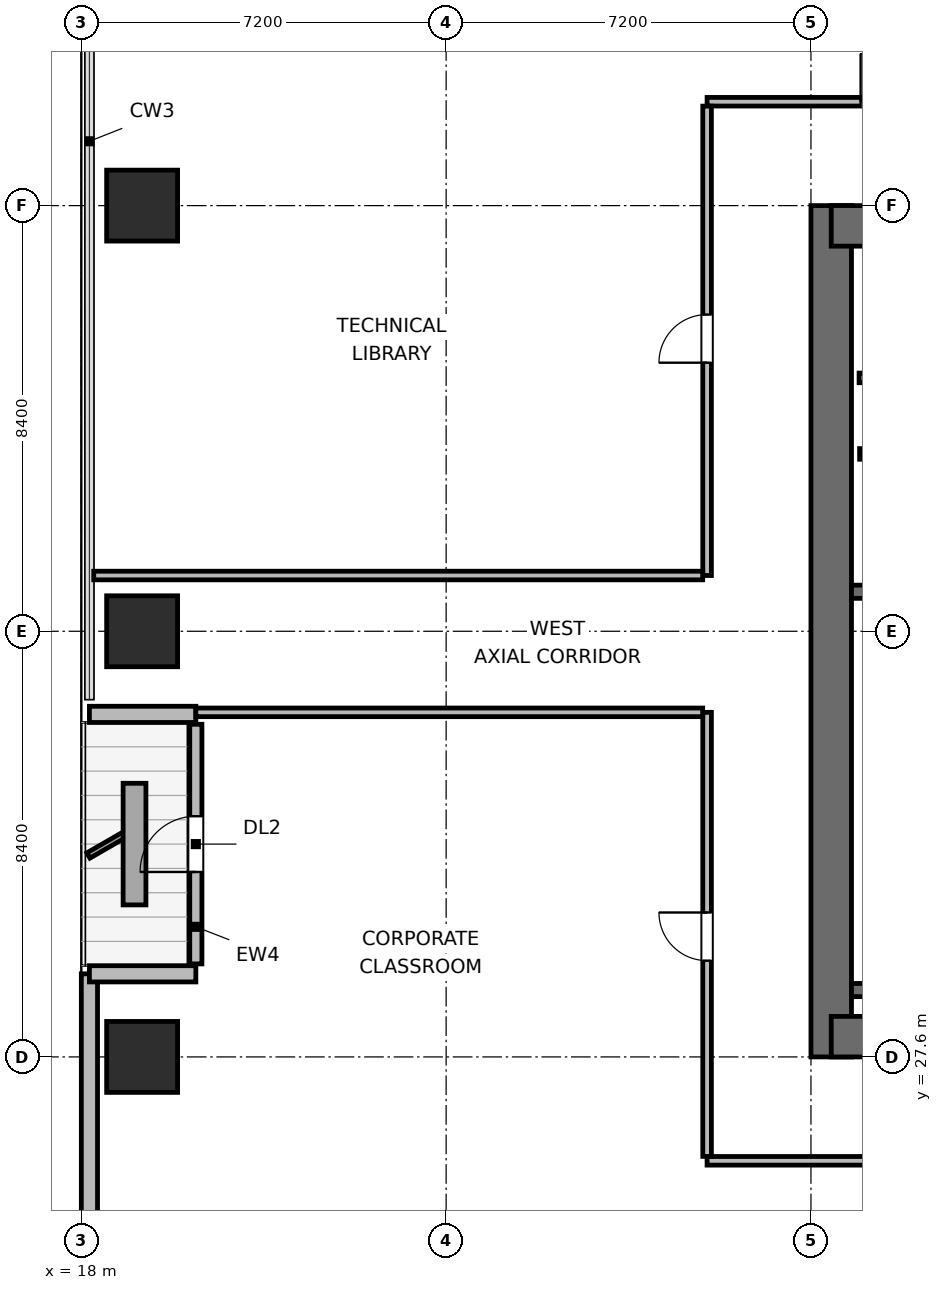
"""IFC4 building model, lengths in metres.
Left out: names, types, materials, properties, quantities, classifications, styles, units other than length and angle.
Written with IfcOpenShell. Run it as: python <this file> out.ifc"""

import sys

from ifc_helpers import new_model, si_unit, direction, frame, frame_2d, origin, origin_2d, place, context, subcontext, project, spatial, rectangle, extrude, element, fill, save


model = new_model("IFC4")
c1 = context("Model", 3, precision=1e-05, world=origin(), true_north=direction((0.0, 1.0)))
c2 = subcontext(c1, "Body", "Model", "MODEL_VIEW")
j1 = project(units=[si_unit("LENGTHUNIT", "METRE"), si_unit("PLANEANGLEUNIT", "RADIAN")], contexts=[c1])
p1 = place(None, origin())
s1 = spatial("IfcSite", under=j1, at=p1, CompositionType="ELEMENT")
p2 = place(p1, origin())
s2 = spatial("IfcBuilding", under=s1, at=p2, CompositionType="ELEMENT")
p3 = place(p2, frame((0.0, 0.0, 141.6)))
s3 = spatial("IfcBuildingStorey", under=s2, at=p3, CompositionType="ELEMENT", Elevation=141.6)
p4 = place(p3, frame((32.8, 27.6, 0.0), z_axis=(0.0, 0.0, 1.0), x_axis=(0.0, 1.0, 0.0)))
e1 = element("IfcWall", 1, at=p4, inside=s3, PredefinedType="SHEAR", context=c2, shape_type="SweptSolid", body=[
    extrude(rectangle(XDim=16.8, YDim=0.8, at=frame_2d((8.4, 0.0))), origin(), (0.0, 0.0, 1.0), 3.9),
])
p5 = place(p3, frame((32.8, 28.0, 0.0), z_axis=(0.0, 0.0, 1.0), x_axis=(1.0, 0.0, 0.0)))
e2 = element("IfcWall", 2, at=p5, inside=s3, PredefinedType="SHEAR", context=c2, shape_type="SweptSolid", body=[
    extrude(rectangle(XDim=9.2, YDim=0.8, at=frame_2d((4.6, 0.0))), origin(), (0.0, 0.0, 1.0), 3.9),
])
p6 = place(p5, frame((4.975, 0.0, 0.0)))
e3 = element("IfcOpeningElement", 3, at=p6, cuts=e2, PredefinedType="OPENING", context=c2, shape_type="SweptSolid", body=[
    extrude(rectangle(XDim=1.05, YDim=2.04, at=frame_2d((0.525, 1.02))), frame((0.0, 0.41, 0.0), z_axis=(0.0, -1.0, 0.0), x_axis=(1.0, 0.0, 0.0)), (0.0, 0.0, 1.0), 0.82),
])
p7 = place(p3, frame((32.8, 44.0, 0.0), z_axis=(0.0, 0.0, 1.0), x_axis=(1.0, 0.0, 0.0)))
e4 = element("IfcWall", 4, at=p7, inside=s3, PredefinedType="SHEAR", context=c2, shape_type="SweptSolid", body=[
    extrude(rectangle(XDim=9.2, YDim=0.8, at=frame_2d((4.6, 0.0))), origin(), (0.0, 0.0, 1.0), 3.9),
])
p8 = place(p7, frame((0.975, 0.0, 0.0)))
e5 = element("IfcOpeningElement", 5, at=p8, cuts=e4, PredefinedType="OPENING", context=c2, shape_type="SweptSolid", body=[
    extrude(rectangle(XDim=0.95, YDim=2.04, at=frame_2d((0.475, 1.02))), frame((0.0, 0.41, 0.0), z_axis=(0.0, -1.0, 0.0), x_axis=(1.0, 0.0, 0.0)), (0.0, 0.0, 1.0), 0.82),
])
p9 = place(p7, frame((4.225, 0.0, 0.0)))
e6 = element("IfcOpeningElement", 6, at=p9, cuts=e4, PredefinedType="OPENING", context=c2, shape_type="SweptSolid", body=[
    extrude(rectangle(XDim=0.9, YDim=2.02, at=frame_2d((0.45, 1.01))), frame((0.0, 0.41, 0.0), z_axis=(0.0, -1.0, 0.0), x_axis=(1.0, 0.0, 0.0)), (0.0, 0.0, 1.0), 0.82),
])
p10 = place(p7, frame((7.125, 0.0, 0.0)))
e7 = element("IfcOpeningElement", 7, at=p10, cuts=e4, PredefinedType="OPENING", context=c2, shape_type="SweptSolid", body=[
    extrude(rectangle(XDim=0.9, YDim=2.02, at=frame_2d((0.45, 1.01))), frame((0.0, 0.41, 0.0), z_axis=(0.0, -1.0, 0.0), x_axis=(1.0, 0.0, 0.0)), (0.0, 0.0, 1.0), 0.82),
])
for number, where, z_axis, x_axis in (
    (8, (33.2, 28.92, 0.0), (0.0, 0.0, 1.0), (1.0, 0.0, 0.0)),
    (9, (33.2, 36.78, 0.0), (0.0, 0.0, 1.0), (1.0, 0.0, 0.0)),
):
    element("IfcWall", number, at=place(p3, frame(where, z_axis=z_axis, x_axis=x_axis)), inside=s3, PredefinedType="SHEAR", context=c2, shape_type="SweptSolid", body=[
        extrude(rectangle(XDim=3.91, YDim=0.26, at=frame_2d((1.955, 0.0))), origin(), (0.0, 0.0, 1.0), 3.9),
    ])
for number, where, z_axis, x_axis in (
    (10, (19.2, 27.6, 0.0), (0.0, 0.0, 1.0), (1.0, 0.0, 0.0)),
    (11, (19.2, 36.0, 0.0), (0.0, 0.0, 1.0), (1.0, 0.0, 0.0)),
    (12, (19.2, 44.4, 0.0), (0.0, 0.0, 1.0), (1.0, 0.0, 0.0)),
):
    element("IfcColumn", number, at=place(p3, frame(where, z_axis=z_axis, x_axis=x_axis)), inside=s3, PredefinedType="COLUMN", context=c2, shape_type="SweptSolid", body=[
        extrude(rectangle(XDim=1.4, YDim=1.4, at=origin_2d()), origin(), (0.0, 0.0, 1.0), 3.9),
    ])
p11 = place(p3, frame((18.16, 15.021, 0.0), z_axis=(0.0, 0.0, 1.0), x_axis=(0.0, 1.0, 0.0)))
e13 = element("IfcWall", 13, at=p11, inside=s3, PredefinedType="SOLIDWALL", context=c2, shape_type="SweptSolid", body=[
    extrude(rectangle(XDim=14.219, YDim=0.32, at=frame_2d((7.109, 0.0))), origin(), (0.0, 0.0, 1.0), 3.6),
])
p12 = place(p3, frame((18.16, 29.24, 0.0), z_axis=(0.0, 0.0, 1.0), x_axis=(1.0, 0.0, 0.0)))
e14 = element("IfcWall", 14, at=p12, inside=s3, PredefinedType="SOLIDWALL", context=c2, shape_type="SweptSolid", body=[
    extrude(rectangle(XDim=2.1, YDim=0.32, at=frame_2d((1.05, 0.0))), origin(), (0.0, 0.0, 1.0), 2.185),
])
p13 = place(p3, frame((20.26, 29.435, 0.0), z_axis=(0.0, 0.0, 1.0), x_axis=(0.0, 1.0, 0.0)))
e15 = element("IfcWall", 15, at=p13, inside=s3, PredefinedType="SOLIDWALL", context=c2, shape_type="SweptSolid", body=[
    extrude(rectangle(XDim=4.73, YDim=0.24, at=frame_2d((2.365, 0.0))), origin(), (0.0, 0.0, 1.0), 3.122),
])
p14 = place(p13, frame((1.815, 0.0, 0.0)))
e16 = element("IfcOpeningElement", 16, at=p14, cuts=e15, PredefinedType="OPENING", context=c2, shape_type="SweptSolid", body=[
    extrude(rectangle(XDim=1.1, YDim=2.04, at=frame_2d((0.55, 1.02))), frame((0.0, 0.13, 0.0), z_axis=(0.0, -1.0, 0.0), x_axis=(1.0, 0.0, 0.0)), (0.0, 0.0, 1.0), 0.26),
])
p15 = place(p3, frame((20.26, 34.36, 0.0), z_axis=(0.0, 0.0, 1.0), x_axis=(-1.0, 0.0, 0.0)))
e17 = element("IfcWall", 17, at=p15, inside=s3, PredefinedType="SOLIDWALL", context=c2, shape_type="SweptSolid", body=[
    extrude(rectangle(XDim=2.1, YDim=0.32, at=frame_2d((1.05, 0.0))), origin(), (0.0, 0.0, 1.0), 2.185),
])
p16 = place(p3, frame((33.35, 41.0, 0.0), z_axis=(0.0, 0.0, 1.0), x_axis=(1.0, 0.0, 0.0)))
e18 = element("IfcWall", 18, at=p16, inside=s3, PredefinedType="PLUMBINGWALL", context=c2, shape_type="SweptSolid", body=[
    extrude(rectangle(XDim=8.1, YDim=0.19, at=frame_2d((4.05, 0.0))), origin(), (0.0, 0.0, 1.0), 3.6),
])
p17 = place(p3, frame((33.36, 39.5, 0.0), z_axis=(0.0, 0.0, 1.0), x_axis=(1.0, 0.0, 0.0)))
e19 = element("IfcWall", 19, at=p17, inside=s3, PredefinedType="PARTITIONING", context=c2, shape_type="SweptSolid", body=[
    extrude(rectangle(XDim=1.86, YDim=0.21, at=frame_2d((0.93, 0.0))), origin(), (0.0, 0.0, 1.0), 3.6),
])
p18 = place(p3, frame((30.35, 25.55, 0.0), z_axis=(0.0, 0.0, 1.0), x_axis=(1.0, 0.0, 0.0)))
e20 = element("IfcWall", 20, at=p18, inside=s3, PredefinedType="PARTITIONING", context=c2, shape_type="SweptSolid", body=[
    extrude(rectangle(XDim=33.25, YDim=0.17, at=frame_2d((16.625, 0.0))), origin(), (0.0, 0.0, 1.0), 3.6),
])
p19 = place(p18, frame((3.21, 0.0, 0.0)))
e21 = element("IfcOpeningElement", 21, at=p19, cuts=e20, PredefinedType="OPENING", context=c2, shape_type="SweptSolid", body=[
    extrude(rectangle(XDim=0.95, YDim=2.04, at=frame_2d((0.475, 1.02))), frame((0.0, 0.095, 0.0), z_axis=(0.0, -1.0, 0.0), x_axis=(1.0, 0.0, 0.0)), (0.0, 0.0, 1.0), 0.19),
])
p20 = place(p18, frame((9.98, 0.0, 0.0)))
e22 = element("IfcOpeningElement", 22, at=p20, cuts=e20, PredefinedType="OPENING", context=c2, shape_type="SweptSolid", body=[
    extrude(rectangle(XDim=0.95, YDim=2.04, at=frame_2d((0.475, 1.02))), frame((0.0, 0.095, 0.0), z_axis=(0.0, -1.0, 0.0), x_axis=(1.0, 0.0, 0.0)), (0.0, 0.0, 1.0), 0.19),
])
p21 = place(p18, frame((16.15, 0.0, 0.0)))
e23 = element("IfcOpeningElement", 23, at=p21, cuts=e20, PredefinedType="OPENING", context=c2, shape_type="SweptSolid", body=[
    extrude(rectangle(XDim=0.95, YDim=2.04, at=frame_2d((0.475, 1.02))), frame((0.0, 0.095, 0.0), z_axis=(0.0, -1.0, 0.0), x_axis=(1.0, 0.0, 0.0)), (0.0, 0.0, 1.0), 0.19),
])
p22 = place(p18, frame((22.32, 0.0, 0.0)))
e24 = element("IfcOpeningElement", 24, at=p22, cuts=e20, PredefinedType="OPENING", context=c2, shape_type="SweptSolid", body=[
    extrude(rectangle(XDim=0.95, YDim=2.04, at=frame_2d((0.475, 1.02))), frame((0.0, 0.095, 0.0), z_axis=(0.0, -1.0, 0.0), x_axis=(1.0, 0.0, 0.0)), (0.0, 0.0, 1.0), 0.19),
])
p23 = place(p18, frame((29.09, 0.0, 0.0)))
e25 = element("IfcOpeningElement", 25, at=p23, cuts=e20, PredefinedType="OPENING", context=c2, shape_type="SweptSolid", body=[
    extrude(rectangle(XDim=0.95, YDim=2.04, at=frame_2d((0.475, 1.02))), frame((0.0, 0.095, 0.0), z_axis=(0.0, -1.0, 0.0), x_axis=(1.0, 0.0, 0.0)), (0.0, 0.0, 1.0), 0.19),
])
p24 = place(p3, frame((30.35, 46.45, 0.0), z_axis=(0.0, 0.0, 1.0), x_axis=(1.0, 0.0, 0.0)))
e26 = element("IfcWall", 26, at=p24, inside=s3, PredefinedType="PARTITIONING", context=c2, shape_type="SweptSolid", body=[
    extrude(rectangle(XDim=33.25, YDim=0.17, at=frame_2d((16.625, 0.0))), origin(), (0.0, 0.0, 1.0), 3.6),
])
p25 = place(p24, frame((3.03, 0.0, 0.0)))
e27 = element("IfcOpeningElement", 27, at=p25, cuts=e26, PredefinedType="OPENING", context=c2, shape_type="SweptSolid", body=[
    extrude(rectangle(XDim=0.95, YDim=2.04, at=frame_2d((0.475, 1.02))), frame((0.0, 0.095, 0.0), z_axis=(0.0, -1.0, 0.0), x_axis=(1.0, 0.0, 0.0)), (0.0, 0.0, 1.0), 0.19),
])
p26 = place(p24, frame((10.09, 0.0, 0.0)))
e28 = element("IfcOpeningElement", 28, at=p26, cuts=e26, PredefinedType="OPENING", context=c2, shape_type="SweptSolid", body=[
    extrude(rectangle(XDim=0.95, YDim=2.04, at=frame_2d((0.475, 1.02))), frame((0.0, 0.095, 0.0), z_axis=(0.0, -1.0, 0.0), x_axis=(1.0, 0.0, 0.0)), (0.0, 0.0, 1.0), 0.19),
])
p27 = place(p24, frame((15.1, 0.0, 0.0)))
e29 = element("IfcOpeningElement", 29, at=p27, cuts=e26, PredefinedType="OPENING", context=c2, shape_type="SweptSolid", body=[
    extrude(rectangle(XDim=0.95, YDim=2.04, at=frame_2d((0.475, 1.02))), frame((0.0, 0.095, 0.0), z_axis=(0.0, -1.0, 0.0), x_axis=(1.0, 0.0, 0.0)), (0.0, 0.0, 1.0), 0.19),
])
p28 = place(p24, frame((21.16, 0.0, 0.0)))
e30 = element("IfcOpeningElement", 30, at=p28, cuts=e26, PredefinedType="OPENING", context=c2, shape_type="SweptSolid", body=[
    extrude(rectangle(XDim=0.95, YDim=2.04, at=frame_2d((0.475, 1.02))), frame((0.0, 0.095, 0.0), z_axis=(0.0, -1.0, 0.0), x_axis=(1.0, 0.0, 0.0)), (0.0, 0.0, 1.0), 0.19),
])
p29 = place(p24, frame((29.27, 0.0, 0.0)))
e31 = element("IfcOpeningElement", 31, at=p29, cuts=e26, PredefinedType="OPENING", context=c2, shape_type="SweptSolid", body=[
    extrude(rectangle(XDim=0.95, YDim=2.04, at=frame_2d((0.475, 1.02))), frame((0.0, 0.095, 0.0), z_axis=(0.0, -1.0, 0.0), x_axis=(1.0, 0.0, 0.0)), (0.0, 0.0, 1.0), 0.19),
])
p30 = place(p3, frame((30.35, 25.637, 0.0), z_axis=(0.0, 0.0, 1.0), x_axis=(0.0, 1.0, 0.0)))
e32 = element("IfcWall", 32, at=p30, inside=s3, PredefinedType="PARTITIONING", context=c2, shape_type="SweptSolid", body=[
    extrude(rectangle(XDim=8.763, YDim=0.17, at=frame_2d((4.381, 0.0))), origin(), (0.0, 0.0, 1.0), 3.6),
])
p31 = place(p30, frame((3.863, 0.0, 0.0)))
e33 = element("IfcOpeningElement", 33, at=p31, cuts=e32, PredefinedType="OPENING", context=c2, shape_type="SweptSolid", body=[
    extrude(rectangle(XDim=0.95, YDim=2.04, at=frame_2d((0.475, 1.02))), frame((0.0, 0.095, 0.0), z_axis=(0.0, -1.0, 0.0), x_axis=(1.0, 0.0, 0.0)), (0.0, 0.0, 1.0), 0.19),
])
p32 = place(p3, frame((30.35, 37.1, 0.0), z_axis=(0.0, 0.0, 1.0), x_axis=(0.0, 1.0, 0.0)))
e34 = element("IfcWall", 34, at=p32, inside=s3, PredefinedType="PARTITIONING", context=c2, shape_type="SweptSolid", body=[
    extrude(rectangle(XDim=9.263, YDim=0.17, at=frame_2d((4.631, 0.0))), origin(), (0.0, 0.0, 1.0), 3.6),
])
p33 = place(p32, frame((4.2, 0.0, 0.0)))
e35 = element("IfcOpeningElement", 35, at=p33, cuts=e34, PredefinedType="OPENING", context=c2, shape_type="SweptSolid", body=[
    extrude(rectangle(XDim=0.95, YDim=2.04, at=frame_2d((0.475, 1.02))), frame((0.0, 0.095, 0.0), z_axis=(0.0, -1.0, 0.0), x_axis=(1.0, 0.0, 0.0)), (0.0, 0.0, 1.0), 0.19),
])
p34 = place(p3, frame((20.26, 34.4, 0.0), z_axis=(0.0, 0.0, 1.0), x_axis=(1.0, 0.0, 0.0)))
e36 = element("IfcWall", 36, at=p34, inside=s3, PredefinedType="PARTITIONING", context=c2, shape_type="SweptSolid", body=[
    extrude(rectangle(XDim=10.003, YDim=0.17, at=frame_2d((5.001, 0.0))), origin(), (0.0, 0.0, 1.0), 3.6),
])
p35 = place(p3, frame((18.245, 37.1, 0.0), z_axis=(0.0, 0.0, 1.0), x_axis=(1.0, 0.0, 0.0)))
e37 = element("IfcWall", 37, at=p35, inside=s3, PredefinedType="PARTITIONING", context=c2, shape_type="SweptSolid", body=[
    extrude(rectangle(XDim=12.018, YDim=0.17, at=frame_2d((6.009, 0.0))), origin(), (0.0, 0.0, 1.0), 3.6),
])
p36 = place(p14, origin())
e38 = element("IfcDoor", 38, at=p36, inside=s3, OperationType="SINGLE_SWING_LEFT", PredefinedType="DOOR", context=c2, shape_type="SweptSolid", body=[
    extrude(rectangle(XDim=1.1, YDim=2.04, at=frame_2d((0.55, 1.02))), frame((0.0, 0.025, 0.0), z_axis=(0.0, -1.0, 0.0), x_axis=(1.0, 0.0, 0.0)), (0.0, 0.0, 1.0), 0.05),
])
fill(e16, e38)
p37 = place(p25, origin())
e39 = element("IfcDoor", 39, at=p37, inside=s3, OperationType="SINGLE_SWING_LEFT", PredefinedType="DOOR", context=c2, shape_type="SweptSolid", body=[
    extrude(rectangle(XDim=0.95, YDim=2.04, at=frame_2d((0.475, 1.02))), frame((0.0, 0.025, 0.0), z_axis=(0.0, -1.0, 0.0), x_axis=(1.0, 0.0, 0.0)), (0.0, 0.0, 1.0), 0.05),
])
fill(e27, e39)
p38 = place(p31, origin())
e40 = element("IfcDoor", 40, at=p38, inside=s3, OperationType="SINGLE_SWING_RIGHT", PredefinedType="DOOR", context=c2, shape_type="SweptSolid", body=[
    extrude(rectangle(XDim=0.95, YDim=2.04, at=frame_2d((0.475, 1.02))), frame((0.0, 0.025, 0.0), z_axis=(0.0, -1.0, 0.0), x_axis=(1.0, 0.0, 0.0)), (0.0, 0.0, 1.0), 0.05),
])
fill(e33, e40)
p39 = place(p33, origin())
e41 = element("IfcDoor", 41, at=p39, inside=s3, OperationType="SINGLE_SWING_LEFT", PredefinedType="DOOR", context=c2, shape_type="SweptSolid", body=[
    extrude(rectangle(XDim=0.95, YDim=2.04, at=frame_2d((0.475, 1.02))), frame((0.0, 0.025, 0.0), z_axis=(0.0, -1.0, 0.0), x_axis=(1.0, 0.0, 0.0)), (0.0, 0.0, 1.0), 0.05),
])
fill(e35, e41)
save(model, sys.argv[1])
